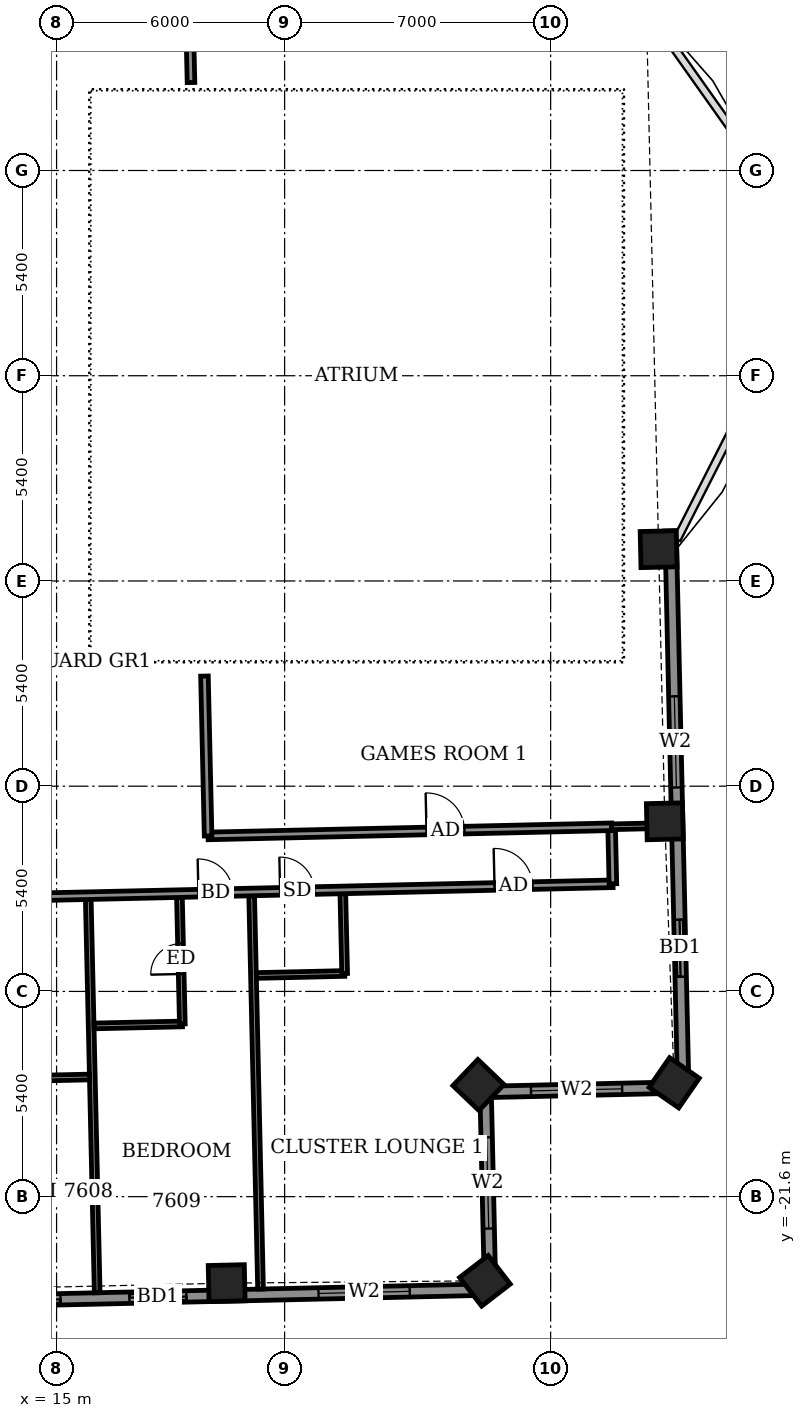
"""IFC4 building model, lengths in metres.
Left out: names, types, materials, properties, quantities, classifications, styles, units other than length and angle.
Written with IfcOpenShell. Run it as: python <this file> out.ifc"""

import sys

from ifc_helpers import new_model, si_unit, direction, frame, frame_2d, origin, origin_2d, place, context, subcontext, project, spatial, rectangle, extrude, element, fill, save


model = new_model("IFC4")
c1 = context("Model", 3, precision=1e-05, world=origin(), true_north=direction((0.0, 1.0)))
c2 = subcontext(c1, "Body", "Model", "MODEL_VIEW")
j1 = project(units=[si_unit("LENGTHUNIT", "METRE"), si_unit("PLANEANGLEUNIT", "RADIAN")], contexts=[c1])
p1 = place(None, origin())
s1 = spatial("IfcSite", under=j1, at=p1, CompositionType="ELEMENT")
p2 = place(p1, origin())
s2 = spatial("IfcBuilding", under=s1, at=p2, CompositionType="ELEMENT")
p3 = place(p2, frame((0.0, 0.0, 297.9)))
s3 = spatial("IfcBuildingStorey", under=s2, at=p3, CompositionType="ELEMENT", Elevation=297.9)
for number, where, z_axis, x_axis in (
    (1, (19.475, -23.876, -0.55), (0.0, 0.0, 1.0), (1.0, 0.023, 0.0)),
    (2, (26.271, -23.814, -0.55), (0.0, 0.0, 1.0), (0.792, 0.61, 0.0)),
    (3, (26.1, -18.664, -0.55), (0.0, 0.0, 1.0), (0.691, 0.723, 0.0)),
    (4, (31.25, -18.604, -0.55), (0.0, 0.0, 1.0), (0.569, 0.822, 0.0)),
    (5, (31.004, -11.724, -0.55), (0.0, 0.0, 1.0), (-0.023, 1.0, 0.0)),
    (6, (30.841, -4.564, -0.55), (0.0, 0.0, 1.0), (-0.023, 1.0, 0.0)),
):
    element("IfcColumn", number, at=place(p3, frame(where, z_axis=z_axis, x_axis=x_axis)), inside=s3, PredefinedType="COLUMN", context=c2, shape_type="SweptSolid", body=[
        extrude(rectangle(XDim=0.95, YDim=0.95, at=origin_2d()), origin(), (0.0, 0.0, 1.0), 3.6),
    ])
p4 = place(p3, frame((31.488, -18.727, 0.0), z_axis=(0.0, 0.0, 1.0), x_axis=(-0.022666132143, 0.999743090226, 0.0)))
e7 = element("IfcWall", 7, at=p4, inside=s3, PredefinedType="SOLIDWALL", context=c2, shape_type="SweptSolid", body=[
    extrude(rectangle(XDim=14.649, YDim=0.3, at=frame_2d((7.324, 0.0))), origin(), (0.0, 0.0, 1.0), 2.5),
])
p5 = place(p4, frame((2.915, 0.0, 0.0)))
e8 = element("IfcOpeningElement", 8, at=p5, cuts=e7, PredefinedType="OPENING", context=c2, shape_type="SweptSolid", body=[
    extrude(rectangle(XDim=1.5, YDim=2.4, at=frame_2d((0.75, 1.2))), frame((0.0, 0.16, 0.0), z_axis=(0.0, -1.0, 0.0), x_axis=(1.0, 0.0, 0.0)), (0.0, 0.0, 1.0), 0.32),
])
p6 = place(p4, frame((7.895, 0.0, 0.9)))
e9 = element("IfcOpeningElement", 9, at=p6, cuts=e7, PredefinedType="OPENING", context=c2, shape_type="SweptSolid", body=[
    extrude(rectangle(XDim=2.4, YDim=1.5, at=frame_2d((1.2, 0.75))), frame((0.0, 0.16, 0.0), z_axis=(0.0, -1.0, 0.0), x_axis=(1.0, 0.0, 0.0)), (0.0, 0.0, 1.0), 0.32),
])
p7 = place(p3, frame((-22.816, -25.161, 0.0), z_axis=(0.0, 0.0, 1.0), x_axis=(0.999742646411, 0.022685699159, 0.0)))
e10 = element("IfcWall", 10, at=p7, inside=s3, PredefinedType="SOLIDWALL", context=c2, shape_type="SweptSolid", body=[
    extrude(rectangle(XDim=49.236, YDim=0.3, at=frame_2d((24.618, 0.0))), origin(), (0.0, 0.0, 1.0), 2.5),
])
p8 = place(p7, frame((0.953, 0.0, 0.0)))
e11 = element("IfcOpeningElement", 11, at=p8, cuts=e10, PredefinedType="OPENING", context=c2, shape_type="SweptSolid", body=[
    extrude(rectangle(XDim=1.5, YDim=2.4, at=frame_2d((0.75, 1.2))), frame((0.0, 0.16, 0.0), z_axis=(0.0, -1.0, 0.0), x_axis=(1.0, 0.0, 0.0)), (0.0, 0.0, 1.0), 0.32),
])
p9 = place(p7, frame((4.051, 0.0, 0.0)))
e12 = element("IfcOpeningElement", 12, at=p9, cuts=e10, PredefinedType="OPENING", context=c2, shape_type="SweptSolid", body=[
    extrude(rectangle(XDim=1.5, YDim=2.4, at=frame_2d((0.75, 1.2))), frame((0.0, 0.16, 0.0), z_axis=(0.0, -1.0, 0.0), x_axis=(1.0, 0.0, 0.0)), (0.0, 0.0, 1.0), 0.32),
])
p10 = place(p7, frame((8.725, 0.0, 0.0)))
e13 = element("IfcOpeningElement", 13, at=p10, cuts=e10, PredefinedType="OPENING", context=c2, shape_type="SweptSolid", body=[
    extrude(rectangle(XDim=1.5, YDim=2.4, at=frame_2d((0.75, 1.2))), frame((0.0, 0.16, 0.0), z_axis=(0.0, -1.0, 0.0), x_axis=(1.0, 0.0, 0.0)), (0.0, 0.0, 1.0), 0.32),
])
p11 = place(p7, frame((12.139, 0.0, 0.0)))
e14 = element("IfcOpeningElement", 14, at=p11, cuts=e10, PredefinedType="OPENING", context=c2, shape_type="SweptSolid", body=[
    extrude(rectangle(XDim=1.2, YDim=2.4, at=frame_2d((0.6, 1.2))), frame((0.0, 0.16, 0.0), z_axis=(0.0, -1.0, 0.0), x_axis=(1.0, 0.0, 0.0)), (0.0, 0.0, 1.0), 0.32),
])
p12 = place(p7, frame((17.6, 0.0, 0.0)))
e15 = element("IfcOpeningElement", 15, at=p12, cuts=e10, PredefinedType="OPENING", context=c2, shape_type="SweptSolid", body=[
    extrude(rectangle(XDim=1.5, YDim=2.4, at=frame_2d((0.75, 1.2))), frame((0.0, 0.16, 0.0), z_axis=(0.0, -1.0, 0.0), x_axis=(1.0, 0.0, 0.0)), (0.0, 0.0, 1.0), 0.32),
])
p13 = place(p7, frame((22.453, 0.0, 0.0)))
e16 = element("IfcOpeningElement", 16, at=p13, cuts=e10, PredefinedType="OPENING", context=c2, shape_type="SweptSolid", body=[
    extrude(rectangle(XDim=1.5, YDim=2.4, at=frame_2d((0.75, 1.2))), frame((0.0, 0.16, 0.0), z_axis=(0.0, -1.0, 0.0), x_axis=(1.0, 0.0, 0.0)), (0.0, 0.0, 1.0), 0.32),
])
p14 = place(p7, frame((25.765, 0.0, 0.0)))
e17 = element("IfcOpeningElement", 17, at=p14, cuts=e10, PredefinedType="OPENING", context=c2, shape_type="SweptSolid", body=[
    extrude(rectangle(XDim=1.5, YDim=2.4, at=frame_2d((0.75, 1.2))), frame((0.0, 0.16, 0.0), z_axis=(0.0, -1.0, 0.0), x_axis=(1.0, 0.0, 0.0)), (0.0, 0.0, 1.0), 0.32),
])
p15 = place(p7, frame((31.25, 0.0, 0.0)))
e18 = element("IfcOpeningElement", 18, at=p15, cuts=e10, PredefinedType="OPENING", context=c2, shape_type="SweptSolid", body=[
    extrude(rectangle(XDim=1.5, YDim=2.4, at=frame_2d((0.75, 1.2))), frame((0.0, 0.16, 0.0), z_axis=(0.0, -1.0, 0.0), x_axis=(1.0, 0.0, 0.0)), (0.0, 0.0, 1.0), 0.32),
])
p16 = place(p7, frame((36.429, 0.0, 0.0)))
e19 = element("IfcOpeningElement", 19, at=p16, cuts=e10, PredefinedType="OPENING", context=c2, shape_type="SweptSolid", body=[
    extrude(rectangle(XDim=1.5, YDim=2.4, at=frame_2d((0.75, 1.2))), frame((0.0, 0.16, 0.0), z_axis=(0.0, -1.0, 0.0), x_axis=(1.0, 0.0, 0.0)), (0.0, 0.0, 1.0), 0.32),
])
p17 = place(p7, frame((39.742, 0.0, 0.0)))
e20 = element("IfcOpeningElement", 20, at=p17, cuts=e10, PredefinedType="OPENING", context=c2, shape_type="SweptSolid", body=[
    extrude(rectangle(XDim=1.5, YDim=2.4, at=frame_2d((0.75, 1.2))), frame((0.0, 0.16, 0.0), z_axis=(0.0, -1.0, 0.0), x_axis=(1.0, 0.0, 0.0)), (0.0, 0.0, 1.0), 0.32),
])
p18 = place(p7, frame((44.72, 0.0, 0.9)))
e21 = element("IfcOpeningElement", 21, at=p18, cuts=e10, PredefinedType="OPENING", context=c2, shape_type="SweptSolid", body=[
    extrude(rectangle(XDim=2.4, YDim=1.5, at=frame_2d((1.2, 0.75))), frame((0.0, 0.16, 0.0), z_axis=(0.0, -1.0, 0.0), x_axis=(1.0, 0.0, 0.0)), (0.0, 0.0, 1.0), 0.32),
])
p19 = place(p3, frame((26.407, -24.044, 0.0), z_axis=(0.0, 0.0, 1.0), x_axis=(-0.022675548694, 0.99974287669, 0.0)))
e22 = element("IfcWall", 22, at=p19, inside=s3, PredefinedType="SOLIDWALL", context=c2, shape_type="SweptSolid", body=[
    extrude(rectangle(XDim=5.2, YDim=0.3, at=frame_2d((2.6, 0.0))), origin(), (0.0, 0.0, 1.0), 2.55),
])
p20 = place(p19, frame((1.605, 0.0, 0.9)))
e23 = element("IfcOpeningElement", 23, at=p20, cuts=e22, PredefinedType="OPENING", context=c2, shape_type="SweptSolid", body=[
    extrude(rectangle(XDim=2.4, YDim=1.5, at=frame_2d((1.2, 0.75))), frame((0.0, 0.16, 0.0), z_axis=(0.0, -1.0, 0.0), x_axis=(1.0, 0.0, 0.0)), (0.0, 0.0, 1.0), 0.32),
])
p21 = place(p3, frame((26.289, -18.845, 0.0), z_axis=(0.0, 0.0, 1.0), x_axis=(0.99974287669, 0.022675548694, 0.0)))
e24 = element("IfcWall", 24, at=p21, inside=s3, PredefinedType="SOLIDWALL", context=c2, shape_type="SweptSolid", body=[
    extrude(rectangle(XDim=5.2, YDim=0.3, at=frame_2d((2.6, 0.0))), origin(), (0.0, 0.0, 1.0), 2.55),
])
p22 = place(p21, frame((1.194, 0.0, 0.9)))
e25 = element("IfcOpeningElement", 25, at=p22, cuts=e24, PredefinedType="OPENING", context=c2, shape_type="SweptSolid", body=[
    extrude(rectangle(XDim=2.4, YDim=1.5, at=frame_2d((1.2, 0.75))), frame((0.0, 0.16, 0.0), z_axis=(0.0, -1.0, 0.0), x_axis=(1.0, 0.0, 0.0)), (0.0, 0.0, 1.0), 0.32),
])
p23 = place(p3, frame((16.069, -24.129, 0.0), z_axis=(0.0, 0.0, 1.0), x_axis=(-0.022714440015, 0.999741993824, 0.0)))
e26 = element("IfcWall", 26, at=p23, inside=s3, PredefinedType="PARTITIONING", context=c2, shape_type="SweptSolid", body=[
    extrude(rectangle(XDim=10.351, YDim=0.15, at=frame_2d((5.175, 0.0))), origin(), (0.0, 0.0, 1.0), 2.5),
])
p24 = place(p3, frame((20.367, -24.031, 0.0), z_axis=(0.0, 0.0, 1.0), x_axis=(-0.022596564565, 0.999744665037, 0.0)))
e27 = element("IfcWall", 27, at=p24, inside=s3, PredefinedType="PARTITIONING", context=c2, shape_type="SweptSolid", body=[
    extrude(rectangle(XDim=10.351, YDim=0.15, at=frame_2d((5.175, 0.0))), origin(), (0.0, 0.0, 1.0), 2.55),
])
for number, where, z_axis, x_axis in (
    (28, (13.542, -18.504, 0.0), (0.0, 0.0, 1.0), (1.0, 0.022, 0.0)),
    (29, (15.986, -17.108, 0.0), (0.0, 0.0, 1.0), (1.0, 0.022, 0.0)),
):
    element("IfcWall", number, at=place(p3, frame(where, z_axis=z_axis, x_axis=x_axis)), inside=s3, PredefinedType="PARTITIONING", context=c2, shape_type="SweptSolid", body=[
        extrude(rectangle(XDim=2.325, YDim=0.15, at=frame_2d((1.163, 0.0))), origin(), (0.0, 0.0, 1.0), 3.05),
    ])
p25 = place(p3, frame((18.309, -17.056, 0.0), z_axis=(0.0, 0.0, 1.0), x_axis=(-0.022876300007, 0.999738303206, 0.0)))
e30 = element("IfcWall", 30, at=p25, inside=s3, PredefinedType="PARTITIONING", context=c2, shape_type="SweptSolid", body=[
    extrude(rectangle(XDim=3.33, YDim=0.15, at=frame_2d((1.665, 0.0))), origin(), (0.0, 0.0, 1.0), 3.05),
])
p26 = place(p25, frame((1.315, 0.0, 0.0)))
e31 = element("IfcOpeningElement", 31, at=p26, cuts=e30, PredefinedType="OPENING", context=c2, shape_type="SweptSolid", body=[
    extrude(rectangle(XDim=0.8, YDim=2.1, at=frame_2d((0.4, 1.05))), frame((0.0, 0.085, 0.0), z_axis=(0.0, -1.0, 0.0), x_axis=(1.0, 0.0, 0.0)), (0.0, 0.0, 1.0), 0.17),
])
p27 = place(p3, frame((20.257, -15.781, 0.0), z_axis=(0.0, 0.0, 1.0), x_axis=(0.999740478815, 0.022781023197, 0.0)))
e32 = element("IfcWall", 32, at=p27, inside=s3, PredefinedType="PARTITIONING", context=c2, shape_type="SweptSolid", body=[
    extrude(rectangle(XDim=2.325, YDim=0.15, at=frame_2d((1.163, 0.0))), origin(), (0.0, 0.0, 1.0), 3.05),
])
p28 = place(p3, frame((22.58, -15.729, 0.0), z_axis=(0.0, 0.0, 1.0), x_axis=(-0.022895647347, 0.999737860308, 0.0)))
e33 = element("IfcWall", 33, at=p28, inside=s3, PredefinedType="PARTITIONING", context=c2, shape_type="SweptSolid", body=[
    extrude(rectangle(XDim=2.101, YDim=0.15, at=frame_2d((1.05, 0.0))), origin(), (0.0, 0.0, 1.0), 3.05),
])
p29 = place(p3, frame((-25.731, -14.624, 0.0), z_axis=(0.0, 0.0, 1.0), x_axis=(0.999742799525, 0.022678950563, 0.0)))
e34 = element("IfcWall", 34, at=p29, inside=s3, PredefinedType="PARTITIONING", context=c2, shape_type="SweptSolid", body=[
    extrude(rectangle(XDim=55.386, YDim=0.2, at=frame_2d((27.693, 0.0))), origin(), (0.0, 0.0, 1.0), 3.05),
])
p30 = place(p29, frame((1.691, 0.0, 0.0)))
e35 = element("IfcOpeningElement", 35, at=p30, cuts=e34, PredefinedType="OPENING", context=c2, shape_type="SweptSolid", body=[
    extrude(rectangle(XDim=1.0, YDim=2.1, at=frame_2d((0.5, 1.05))), frame((0.0, 0.11, 0.0), z_axis=(0.0, -1.0, 0.0), x_axis=(1.0, 0.0, 0.0)), (0.0, 0.0, 1.0), 0.22),
])
p31 = place(p29, frame((8.5, 0.0, 0.0)))
e36 = element("IfcOpeningElement", 36, at=p31, cuts=e34, PredefinedType="OPENING", context=c2, shape_type="SweptSolid", body=[
    extrude(rectangle(XDim=0.9, YDim=2.1, at=frame_2d((0.45, 1.05))), frame((0.0, 0.11, 0.0), z_axis=(0.0, -1.0, 0.0), x_axis=(1.0, 0.0, 0.0)), (0.0, 0.0, 1.0), 0.22),
])
p32 = place(p29, frame((10.5, 0.0, 0.0)))
e37 = element("IfcOpeningElement", 37, at=p32, cuts=e34, PredefinedType="OPENING", context=c2, shape_type="SweptSolid", body=[
    extrude(rectangle(XDim=0.9, YDim=2.1, at=frame_2d((0.45, 1.05))), frame((0.0, 0.11, 0.0), z_axis=(0.0, -1.0, 0.0), x_axis=(1.0, 0.0, 0.0)), (0.0, 0.0, 1.0), 0.22),
])
p33 = place(p29, frame((17.325, 0.0, 0.0)))
e38 = element("IfcOpeningElement", 38, at=p33, cuts=e34, PredefinedType="OPENING", context=c2, shape_type="SweptSolid", body=[
    extrude(rectangle(XDim=0.9, YDim=2.1, at=frame_2d((0.45, 1.05))), frame((0.0, 0.11, 0.0), z_axis=(0.0, -1.0, 0.0), x_axis=(1.0, 0.0, 0.0)), (0.0, 0.0, 1.0), 0.22),
])
p34 = place(p29, frame((19.375, 0.0, 0.0)))
e39 = element("IfcOpeningElement", 39, at=p34, cuts=e34, PredefinedType="OPENING", context=c2, shape_type="SweptSolid", body=[
    extrude(rectangle(XDim=0.9, YDim=2.1, at=frame_2d((0.45, 1.05))), frame((0.0, 0.11, 0.0), z_axis=(0.0, -1.0, 0.0), x_axis=(1.0, 0.0, 0.0)), (0.0, 0.0, 1.0), 0.22),
])
p35 = place(p29, frame((26.275, 0.0, 0.0)))
e40 = element("IfcOpeningElement", 40, at=p35, cuts=e34, PredefinedType="OPENING", context=c2, shape_type="SweptSolid", body=[
    extrude(rectangle(XDim=0.9, YDim=2.1, at=frame_2d((0.45, 1.05))), frame((0.0, 0.11, 0.0), z_axis=(0.0, -1.0, 0.0), x_axis=(1.0, 0.0, 0.0)), (0.0, 0.0, 1.0), 0.22),
])
p36 = place(p29, frame((28.425, 0.0, 0.0)))
e41 = element("IfcOpeningElement", 41, at=p36, cuts=e34, PredefinedType="OPENING", context=c2, shape_type="SweptSolid", body=[
    extrude(rectangle(XDim=0.9, YDim=2.1, at=frame_2d((0.45, 1.05))), frame((0.0, 0.11, 0.0), z_axis=(0.0, -1.0, 0.0), x_axis=(1.0, 0.0, 0.0)), (0.0, 0.0, 1.0), 0.22),
])
p37 = place(p29, frame((35.425, 0.0, 0.0)))
e42 = element("IfcOpeningElement", 42, at=p37, cuts=e34, PredefinedType="OPENING", context=c2, shape_type="SweptSolid", body=[
    extrude(rectangle(XDim=0.9, YDim=2.1, at=frame_2d((0.45, 1.05))), frame((0.0, 0.11, 0.0), z_axis=(0.0, -1.0, 0.0), x_axis=(1.0, 0.0, 0.0)), (0.0, 0.0, 1.0), 0.22),
])
p38 = place(p29, frame((37.625, 0.0, 0.0)))
e43 = element("IfcOpeningElement", 43, at=p38, cuts=e34, PredefinedType="OPENING", context=c2, shape_type="SweptSolid", body=[
    extrude(rectangle(XDim=0.9, YDim=2.1, at=frame_2d((0.45, 1.05))), frame((0.0, 0.11, 0.0), z_axis=(0.0, -1.0, 0.0), x_axis=(1.0, 0.0, 0.0)), (0.0, 0.0, 1.0), 0.22),
])
p39 = place(p29, frame((44.475, 0.0, 0.0)))
e44 = element("IfcOpeningElement", 44, at=p39, cuts=e34, PredefinedType="OPENING", context=c2, shape_type="SweptSolid", body=[
    extrude(rectangle(XDim=0.9, YDim=2.1, at=frame_2d((0.45, 1.05))), frame((0.0, 0.11, 0.0), z_axis=(0.0, -1.0, 0.0), x_axis=(1.0, 0.0, 0.0)), (0.0, 0.0, 1.0), 0.22),
])
p40 = place(p29, frame((52.268, 0.0, 0.0)))
e45 = element("IfcOpeningElement", 45, at=p40, cuts=e34, PredefinedType="OPENING", context=c2, shape_type="SweptSolid", body=[
    extrude(rectangle(XDim=1.0, YDim=2.1, at=frame_2d((0.5, 1.05))), frame((0.0, 0.11, 0.0), z_axis=(0.0, -1.0, 0.0), x_axis=(1.0, 0.0, 0.0)), (0.0, 0.0, 1.0), 0.22),
])
p41 = place(p29, frame((46.625, 0.0, 0.0)))
e46 = element("IfcOpeningElement", 46, at=p41, cuts=e34, PredefinedType="OPENING", context=c2, shape_type="SweptSolid", body=[
    extrude(rectangle(XDim=0.9, YDim=2.1, at=frame_2d((0.45, 1.05))), frame((0.0, 0.11, 0.0), z_axis=(0.0, -1.0, 0.0), x_axis=(1.0, 0.0, 0.0)), (0.0, 0.0, 1.0), 0.22),
])
p42 = place(p3, frame((29.638, -13.368, 0.0), z_axis=(0.0, 0.0, 1.0), x_axis=(-0.022617910375, 0.999744182344, 0.0)))
e47 = element("IfcWall", 47, at=p42, inside=s3, PredefinedType="PARTITIONING", context=c2, shape_type="SweptSolid", body=[
    extrude(rectangle(XDim=1.5, YDim=0.2, at=frame_2d((0.75, 0.0))), origin(), (0.0, 0.0, 1.0), 3.05),
])
p43 = place(p3, frame((18.985, -12.109, 0.0), z_axis=(0.0, 0.0, 1.0), x_axis=(0.999742771882, 0.022680169073, 0.0)))
e48 = element("IfcWall", 48, at=p43, inside=s3, PredefinedType="PARTITIONING", context=c2, shape_type="SweptSolid", body=[
    extrude(rectangle(XDim=10.625, YDim=0.2, at=frame_2d((5.312, 0.0))), origin(), (0.0, 0.0, 1.0), 3.05),
])
p44 = place(p43, frame((5.75, 0.0, 0.0)))
e49 = element("IfcOpeningElement", 49, at=p44, cuts=e48, PredefinedType="OPENING", context=c2, shape_type="SweptSolid", body=[
    extrude(rectangle(XDim=1.0, YDim=2.1, at=frame_2d((0.5, 1.05))), frame((0.0, 0.11, 0.0), z_axis=(0.0, -1.0, 0.0), x_axis=(1.0, 0.0, 0.0)), (0.0, 0.0, 1.0), 0.22),
])
p45 = place(p3, frame((18.987, -12.109, 0.0), z_axis=(0.0, 0.0, 1.0), x_axis=(-0.022807092041, 0.999739884446, 0.0)))
e50 = element("IfcWall", 50, at=p45, inside=s3, PredefinedType="PARTITIONING", context=c2, shape_type="SweptSolid", body=[
    extrude(rectangle(XDim=4.207, YDim=0.2, at=frame_2d((2.104, 0.0))), origin(), (0.0, 0.0, 1.0), 3.05),
])
p46 = place(p3, frame((29.603, -11.868, 0.0), z_axis=(0.0, 0.0, 1.0), x_axis=(0.999741755729, 0.022724916977, 0.0)))
e51 = element("IfcWall", 51, at=p46, inside=s3, PredefinedType="PARTITIONING", context=c2, shape_type="SweptSolid", body=[
    extrude(rectangle(XDim=1.579, YDim=0.15, at=frame_2d((0.79, 0.0))), origin(), (0.0, 0.0, 1.0), 3.05),
])
p47 = place(p3, frame((18.537, 7.714, 0.0), z_axis=(0.0, 0.0, 1.0), x_axis=(-0.022773383809, 0.999740652864, 0.0)))
e52 = element("IfcWall", 52, at=p47, inside=s3, PredefinedType="PARTITIONING", context=c2, shape_type="SweptSolid", body=[
    extrude(rectangle(XDim=6.722, YDim=0.2, at=frame_2d((3.361, 0.0))), origin(), (0.0, 0.0, 1.0), 3.05),
])
p48 = place(p5, origin())
e53 = element("IfcDoor", 53, at=p48, inside=s3, OperationType="SLIDING_TO_LEFT", PredefinedType="DOOR", context=c2, shape_type="SweptSolid", body=[
    extrude(rectangle(XDim=1.5, YDim=2.4, at=frame_2d((0.75, 1.2))), frame((0.0, 0.025, 0.0), z_axis=(0.0, -1.0, 0.0), x_axis=(1.0, 0.0, 0.0)), (0.0, 0.0, 1.0), 0.05),
])
fill(e8, e53)
p49 = place(p6, origin())
e54 = element("IfcWindow", 54, at=p49, inside=s3, PartitioningType="DOUBLE_PANEL_VERTICAL", PredefinedType="WINDOW", context=c2, shape_type="SweptSolid", body=[
    extrude(rectangle(XDim=2.4, YDim=1.5, at=frame_2d((1.2, 0.75))), frame((0.0, 0.03, 0.0), z_axis=(0.0, -1.0, 0.0), x_axis=(1.0, 0.0, 0.0)), (0.0, 0.0, 1.0), 0.06),
])
fill(e9, e54)
p50 = place(p16, origin())
e55 = element("IfcDoor", 55, at=p50, inside=s3, OperationType="SLIDING_TO_LEFT", PredefinedType="DOOR", context=c2, shape_type="SweptSolid", body=[
    extrude(rectangle(XDim=1.5, YDim=2.4, at=frame_2d((0.75, 1.2))), frame((0.0, 0.025, 0.0), z_axis=(0.0, -1.0, 0.0), x_axis=(1.0, 0.0, 0.0)), (0.0, 0.0, 1.0), 0.05),
])
fill(e19, e55)
p51 = place(p17, origin())
e56 = element("IfcDoor", 56, at=p51, inside=s3, OperationType="SLIDING_TO_LEFT", PredefinedType="DOOR", context=c2, shape_type="SweptSolid", body=[
    extrude(rectangle(XDim=1.5, YDim=2.4, at=frame_2d((0.75, 1.2))), frame((0.0, 0.025, 0.0), z_axis=(0.0, -1.0, 0.0), x_axis=(1.0, 0.0, 0.0)), (0.0, 0.0, 1.0), 0.05),
])
fill(e20, e56)
p52 = place(p18, origin())
e57 = element("IfcWindow", 57, at=p52, inside=s3, PartitioningType="DOUBLE_PANEL_VERTICAL", PredefinedType="WINDOW", context=c2, shape_type="SweptSolid", body=[
    extrude(rectangle(XDim=2.4, YDim=1.5, at=frame_2d((1.2, 0.75))), frame((0.0, 0.03, 0.0), z_axis=(0.0, -1.0, 0.0), x_axis=(1.0, 0.0, 0.0)), (0.0, 0.0, 1.0), 0.06),
])
fill(e21, e57)
p53 = place(p20, origin())
e58 = element("IfcWindow", 58, at=p53, inside=s3, PartitioningType="DOUBLE_PANEL_VERTICAL", PredefinedType="WINDOW", context=c2, shape_type="SweptSolid", body=[
    extrude(rectangle(XDim=2.4, YDim=1.5, at=frame_2d((1.2, 0.75))), frame((0.0, 0.03, 0.0), z_axis=(0.0, -1.0, 0.0), x_axis=(1.0, 0.0, 0.0)), (0.0, 0.0, 1.0), 0.06),
])
fill(e23, e58)
p54 = place(p22, origin())
e59 = element("IfcWindow", 59, at=p54, inside=s3, PartitioningType="DOUBLE_PANEL_VERTICAL", PredefinedType="WINDOW", context=c2, shape_type="SweptSolid", body=[
    extrude(rectangle(XDim=2.4, YDim=1.5, at=frame_2d((1.2, 0.75))), frame((0.0, 0.03, 0.0), z_axis=(0.0, -1.0, 0.0), x_axis=(1.0, 0.0, 0.0)), (0.0, 0.0, 1.0), 0.06),
])
fill(e25, e59)
p55 = place(p39, origin())
e60 = element("IfcDoor", 60, at=p55, inside=s3, OperationType="SINGLE_SWING_LEFT", PredefinedType="DOOR", context=c2, shape_type="SweptSolid", body=[
    extrude(rectangle(XDim=0.9, YDim=2.1, at=frame_2d((0.45, 1.05))), frame((0.0, 0.025, 0.0), z_axis=(0.0, -1.0, 0.0), x_axis=(1.0, 0.0, 0.0)), (0.0, 0.0, 1.0), 0.05),
])
fill(e44, e60)
p56 = place(p26, origin())
e61 = element("IfcDoor", 61, at=p56, inside=s3, OperationType="SINGLE_SWING_LEFT", PredefinedType="DOOR", context=c2, shape_type="SweptSolid", body=[
    extrude(rectangle(XDim=0.8, YDim=2.1, at=frame_2d((0.4, 1.05))), frame((0.0, 0.025, 0.0), z_axis=(0.0, -1.0, 0.0), x_axis=(1.0, 0.0, 0.0)), (0.0, 0.0, 1.0), 0.05),
])
fill(e31, e61)
p57 = place(p40, origin())
e62 = element("IfcDoor", 62, at=p57, inside=s3, OperationType="SINGLE_SWING_RIGHT", PredefinedType="DOOR", context=c2, shape_type="SweptSolid", body=[
    extrude(rectangle(XDim=1.0, YDim=2.1, at=frame_2d((0.5, 1.05))), frame((0.0, 0.025, 0.0), z_axis=(0.0, -1.0, 0.0), x_axis=(1.0, 0.0, 0.0)), (0.0, 0.0, 1.0), 0.05),
])
fill(e45, e62)
p58 = place(p41, origin())
e63 = element("IfcDoor", 63, at=p58, inside=s3, OperationType="SINGLE_SWING_LEFT", PredefinedType="DOOR", context=c2, shape_type="SweptSolid", body=[
    extrude(rectangle(XDim=0.9, YDim=2.1, at=frame_2d((0.45, 1.05))), frame((0.0, 0.025, 0.0), z_axis=(0.0, -1.0, 0.0), x_axis=(1.0, 0.0, 0.0)), (0.0, 0.0, 1.0), 0.05),
])
fill(e46, e63)
p59 = place(p44, origin())
e64 = element("IfcDoor", 64, at=p59, inside=s3, OperationType="SINGLE_SWING_LEFT", PredefinedType="DOOR", context=c2, shape_type="SweptSolid", body=[
    extrude(rectangle(XDim=1.0, YDim=2.1, at=frame_2d((0.5, 1.05))), frame((0.0, 0.025, 0.0), z_axis=(0.0, -1.0, 0.0), x_axis=(1.0, 0.0, 0.0)), (0.0, 0.0, 1.0), 0.05),
])
fill(e49, e64)
save(model, sys.argv[1])
